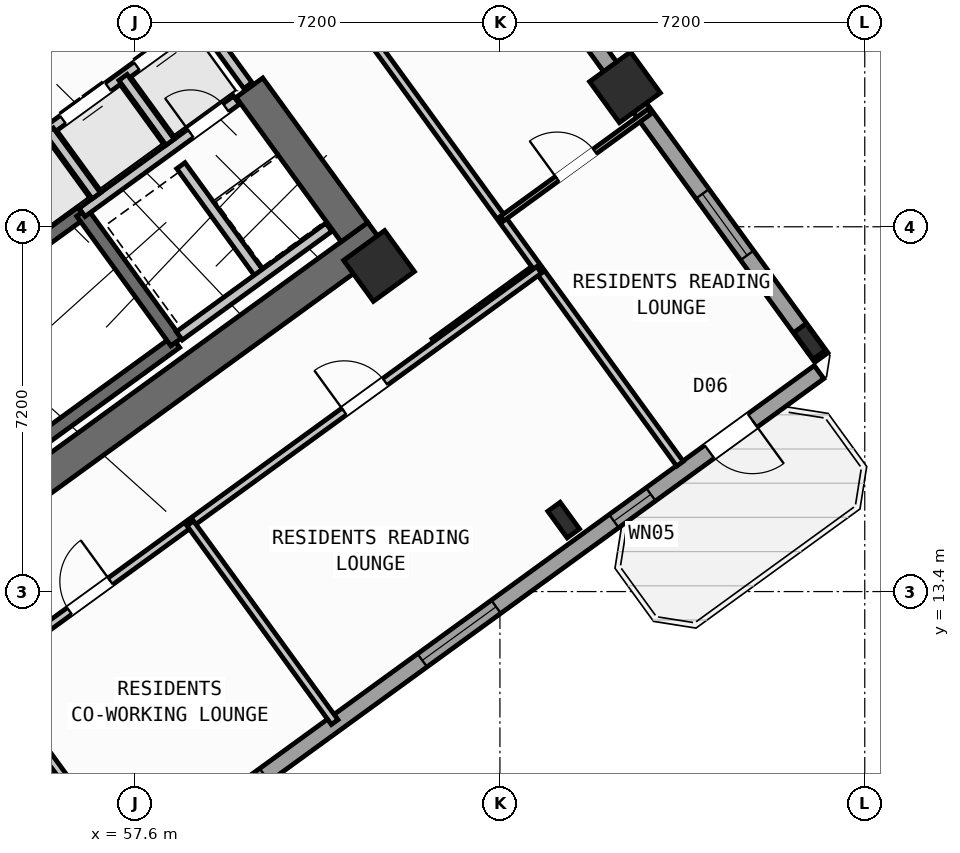
"""IFC4 building model, lengths in metres.
Left out: names, types, materials, properties, quantities, classifications, styles, units other than length and angle.
Written with IfcOpenShell. Run it as: python <this file> out.ifc"""

import sys

from ifc_helpers import new_model, si_unit, direction, frame, frame_2d, origin, origin_2d, place, context, subcontext, project, spatial, rectangle, hollow_rectangle, i_section, extrude, source, transform, mapped, element, fill, save


model = new_model("IFC4")
c1 = context("Model", 3, precision=1e-05, world=origin(), true_north=direction((0.0, 1.0)))
c2 = subcontext(c1, "Body", "Model", "MODEL_VIEW")
j1 = project(units=[si_unit("LENGTHUNIT", "METRE"), si_unit("PLANEANGLEUNIT", "RADIAN")], contexts=[c1])
p1 = place(None, origin())
s1 = spatial("IfcSite", under=j1, at=p1, CompositionType="ELEMENT")
p2 = place(p1, origin())
s2 = spatial("IfcBuilding", under=s1, at=p2, CompositionType="ELEMENT")
p3 = place(p2, frame((0.0, 0.0, 34.8)))
s3 = spatial("IfcBuildingStorey", under=s2, at=p3, CompositionType="ELEMENT", Elevation=34.8)
p4 = place(p3, frame((52.318, 13.11, 0.0), z_axis=(0.0, 0.0, 1.0), x_axis=(0.809019445368, 0.587781878776, 0.0)))
e1 = element("IfcWall", 1, at=p4, inside=s3, PredefinedType="SHEAR", context=c2, shape_type="SweptSolid", body=[
    extrude(rectangle(XDim=12.44, YDim=0.65, at=frame_2d((6.22, 0.0))), origin(), (0.0, 0.0, 1.0), 3.35),
])
p5 = place(p3, frame((61.929, 20.494, 0.0), z_axis=(0.0, 0.0, 1.0), x_axis=(-0.58782982593, 0.808984607855, 0.0)))
e2 = element("IfcWall", 2, at=p5, inside=s3, PredefinedType="SHEAR", context=c2, shape_type="SweptSolid", body=[
    extrude(rectangle(XDim=3.525, YDim=0.65, at=frame_2d((1.762, 0.0))), origin(), (0.0, 0.0, 1.0), 3.35),
])
m1 = source(origin(), c2, "Body", "SweptSolid", [
    extrude(i_section(OverallWidth=0.3, OverallDepth=0.65, WebThickness=0.016, FlangeThickness=0.031, at=origin_2d()), origin(), (0.0, 0.0, 1.0), 3.6),
])
p6 = place(p3, frame((66.058, 14.811, 0.0), z_axis=(0.0, 0.0, 1.0), x_axis=(0.809016994375, 0.587785252292, 0.0)))
e3 = element("IfcColumn", 3, at=p6, inside=s3, PredefinedType="COLUMN", context=c2, shape_type="MappedRepresentation", body=[
    mapped(m1, transform((0.0, 0.0, 0.0), scale=1.0)),
])
m2 = source(origin(), c2, "Body", "SweptSolid", [
    extrude(hollow_rectangle(XDim=1.0, YDim=1.0, WallThickness=0.04, at=origin_2d()), origin(), (0.0, 0.0, 1.0), 3.6),
])
p7 = place(p3, frame((62.414, 19.827, 0.0), z_axis=(0.0, 0.0, 1.0), x_axis=(0.809016994375, 0.587785252292, 0.0)))
e4 = element("IfcColumn", 4, at=p7, inside=s3, PredefinedType="COLUMN", context=c2, shape_type="MappedRepresentation", body=[
    mapped(m2, transform((0.0, 0.0, 0.0), scale=1.0)),
])
p8 = place(p3, frame((70.912, 18.338, 0.0), z_axis=(0.0, 0.0, 1.0), x_axis=(0.809016994375, 0.587785252292, 0.0)))
e5 = element("IfcColumn", 5, at=p8, inside=s3, PredefinedType="COLUMN", context=c2, shape_type="MappedRepresentation", body=[
    mapped(m1, transform((0.0, 0.0, 0.0), scale=1.0)),
])
p9 = place(p3, frame((67.268, 23.354, 0.0), z_axis=(0.0, 0.0, 1.0), x_axis=(0.809016994375, 0.587785252292, 0.0)))
e6 = element("IfcColumn", 6, at=p9, inside=s3, PredefinedType="COLUMN", context=c2, shape_type="MappedRepresentation", body=[
    mapped(m2, transform((0.0, 0.0, 0.0), scale=1.0)),
])
p10 = place(p3, frame((58.455, 35.484, 0.0), z_axis=(0.0, 0.0, 1.0), x_axis=(0.587783625747, -0.809018176127, 0.0)))
e7 = element("IfcWall", 7, at=p10, inside=s3, PredefinedType="STANDARD", context=c2, shape_type="SweptSolid", body=[
    extrude(rectangle(XDim=21.587, YDim=0.32, at=frame_2d((10.794, 0.0))), origin(), (0.0, 0.0, 1.0), 2.725),
])
p11 = place(p10, frame((1.529, 0.0, 0.85)))
e8 = element("IfcOpeningElement", 8, at=p11, cuts=e7, PredefinedType="OPENING", context=c2, shape_type="SweptSolid", body=[
    extrude(rectangle(XDim=1.8, YDim=1.5, at=frame_2d((0.9, 0.75))), frame((0.0, 0.17, 0.0), z_axis=(0.0, -1.0, 0.0), x_axis=(1.0, 0.0, 0.0)), (0.0, 0.0, 1.0), 0.34),
])
p12 = place(p10, frame((10.444, 0.0, 0.85)))
e9 = element("IfcOpeningElement", 9, at=p12, cuts=e7, PredefinedType="OPENING", context=c2, shape_type="SweptSolid", body=[
    extrude(rectangle(XDim=1.8, YDim=1.5, at=frame_2d((0.9, 0.75))), frame((0.0, 0.17, 0.0), z_axis=(0.0, -1.0, 0.0), x_axis=(1.0, 0.0, 0.0)), (0.0, 0.0, 1.0), 0.34),
])
p13 = place(p10, frame((17.595, 0.0, 0.85)))
e10 = element("IfcOpeningElement", 10, at=p13, cuts=e7, PredefinedType="OPENING", context=c2, shape_type="SweptSolid", body=[
    extrude(rectangle(XDim=1.5, YDim=1.5, at=frame_2d((0.75, 0.75))), frame((0.0, 0.17, 0.0), z_axis=(0.0, -1.0, 0.0), x_axis=(1.0, 0.0, 0.0)), (0.0, 0.0, 1.0), 0.34),
])
p14 = place(p3, frame((71.098, 17.731, 0.0), z_axis=(0.0, 0.0, 1.0), x_axis=(-0.809021120468, -0.587779573171, 0.0)))
e11 = element("IfcWall", 11, at=p14, inside=s3, PredefinedType="STANDARD", context=c2, shape_type="SweptSolid", body=[
    extrude(rectangle(XDim=17.588, YDim=0.32, at=frame_2d((8.794, 0.0))), origin(), (0.0, 0.0, 1.0), 3.35),
])
p15 = place(p14, frame((1.624, 0.0, 0.0)))
e12 = element("IfcOpeningElement", 12, at=p15, cuts=e11, PredefinedType="OPENING", context=c2, shape_type="SweptSolid", body=[
    extrude(rectangle(XDim=1.05, YDim=2.15, at=frame_2d((0.525, 1.075))), frame((0.0, 0.17, 0.0), z_axis=(0.0, -1.0, 0.0), x_axis=(1.0, 0.0, 0.0)), (0.0, 0.0, 1.0), 0.34),
])
p16 = place(p14, frame((4.104, 0.0, 1.0)))
e13 = element("IfcOpeningElement", 13, at=p16, cuts=e11, PredefinedType="OPENING", context=c2, shape_type="SweptSolid", body=[
    extrude(rectangle(XDim=0.9, YDim=1.25, at=frame_2d((0.45, 0.625))), frame((0.0, 0.17, 0.0), z_axis=(0.0, -1.0, 0.0), x_axis=(1.0, 0.0, 0.0)), (0.0, 0.0, 1.0), 0.34),
])
p17 = place(p14, frame((7.879, 0.0, 0.85)))
e14 = element("IfcOpeningElement", 14, at=p17, cuts=e11, PredefinedType="OPENING", context=c2, shape_type="SweptSolid", body=[
    extrude(rectangle(XDim=1.8, YDim=1.5, at=frame_2d((0.9, 0.75))), frame((0.0, 0.17, 0.0), z_axis=(0.0, -1.0, 0.0), x_axis=(1.0, 0.0, 0.0)), (0.0, 0.0, 1.0), 0.34),
])
p18 = place(p14, frame((13.529, 0.0, 0.85)))
e15 = element("IfcOpeningElement", 15, at=p18, cuts=e11, PredefinedType="OPENING", context=c2, shape_type="SweptSolid", body=[
    extrude(rectangle(XDim=1.5, YDim=1.5, at=frame_2d((0.75, 0.75))), frame((0.0, 0.17, 0.0), z_axis=(0.0, -1.0, 0.0), x_axis=(1.0, 0.0, 0.0)), (0.0, 0.0, 1.0), 0.34),
])
p19 = place(p3, frame((56.581, 7.439, 0.0), z_axis=(0.0, 0.0, 1.0), x_axis=(-0.587785875463, 0.809016541614, 0.0)))
e16 = element("IfcWall", 16, at=p19, inside=s3, PredefinedType="STANDARD", context=c2, shape_type="SweptSolid", body=[
    extrude(rectangle(XDim=6.774, YDim=0.32, at=frame_2d((3.387, 0.0))), origin(), (0.0, 0.0, 1.0), 2.725),
])
p20 = place(p19, frame((1.556, 0.0, 0.8)))
e17 = element("IfcOpeningElement", 17, at=p20, cuts=e16, PredefinedType="OPENING", context=c2, shape_type="SweptSolid", body=[
    extrude(rectangle(XDim=2.1, YDim=1.55, at=frame_2d((1.05, 0.775))), frame((0.0, 0.17, 0.0), z_axis=(0.0, -1.0, 0.0), x_axis=(1.0, 0.0, 0.0)), (0.0, 0.0, 1.0), 0.34),
])
p21 = place(p3, frame((49.863, 23.44, 0.0), z_axis=(0.0, 0.0, 1.0), x_axis=(0.809003474932, 0.587803859759, 0.0)))
e18 = element("IfcWall", 18, at=p21, inside=s3, PredefinedType="SHEAR", context=c2, shape_type="SweptSolid", body=[
    extrude(rectangle(XDim=7.46, YDim=0.26, at=frame_2d((3.73, 0.0))), origin(), (0.0, 0.0, 1.0), 3.35),
])
p22 = place(p21, frame((0.36, 0.0, 0.0)))
e19 = element("IfcOpeningElement", 19, at=p22, cuts=e18, PredefinedType="OPENING", context=c2, shape_type="SweptSolid", body=[
    extrude(rectangle(XDim=0.86, YDim=2.05, at=frame_2d((0.43, 1.025))), frame((0.0, 0.14, 0.0), z_axis=(0.0, -1.0, 0.0), x_axis=(1.0, 0.0, 0.0)), (0.0, 0.0, 1.0), 0.28),
])
p23 = place(p3, frame((52.472, 14.013, 0.0), z_axis=(0.0, 0.0, 1.0), x_axis=(0.809028366311, 0.587769599847, 0.0)))
e20 = element("IfcWall", 20, at=p23, inside=s3, PredefinedType="SHEAR", context=c2, shape_type="SweptSolid", body=[
    extrude(rectangle(XDim=7.33, YDim=0.26, at=frame_2d((3.665, 0.0))), origin(), (0.0, 0.0, 1.0), 3.35),
])
p24 = place(p3, frame((50.615, 16.57, 0.0), z_axis=(0.0, 0.0, 1.0), x_axis=(0.809028366311, 0.587769599847, 0.0)))
e21 = element("IfcWall", 21, at=p24, inside=s3, PredefinedType="SHEAR", context=c2, shape_type="SweptSolid", body=[
    extrude(rectangle(XDim=7.33, YDim=0.26, at=frame_2d((3.665, 0.0))), origin(), (0.0, 0.0, 1.0), 3.35),
])
p25 = place(p24, frame((0.22, 0.0, 0.0)))
e22 = element("IfcOpeningElement", 22, at=p25, cuts=e21, PredefinedType="OPENING", context=c2, shape_type="SweptSolid", body=[
    extrude(rectangle(XDim=1.1, YDim=2.1, at=frame_2d((0.55, 1.05))), frame((0.0, 0.14, 0.0), z_axis=(0.0, -1.0, 0.0), x_axis=(1.0, 0.0, 0.0)), (0.0, 0.0, 1.0), 0.28),
])
p26 = place(p3, frame((58.41, 18.327, 0.0), z_axis=(0.0, 0.0, 1.0), x_axis=(-0.58776738483, 0.809029975545, 0.0)))
e23 = element("IfcWall", 23, at=p26, inside=s3, PredefinedType="SHEAR", context=c2, shape_type="SweptSolid", body=[
    extrude(rectangle(XDim=3.16, YDim=0.26, at=frame_2d((1.58, 0.0))), origin(), (0.0, 0.0, 1.0), 3.35),
])
p27 = place(p3, frame((56.553, 20.884, 0.0), z_axis=(0.0, 0.0, 1.0), x_axis=(0.809035789462, 0.587759382205, 0.0)))
e24 = element("IfcWall", 24, at=p27, inside=s3, PredefinedType="STANDARD", context=c2, shape_type="SweptSolid", body=[
    extrude(rectangle(XDim=3.768, YDim=0.2, at=frame_2d((1.884, 0.0))), origin(), (0.0, 0.0, 1.0), 3.34),
])
p28 = place(p27, frame((2.65, 0.0, 0.0)))
e25 = element("IfcOpeningElement", 25, at=p28, cuts=e24, PredefinedType="OPENING", context=c2, shape_type="SweptSolid", body=[
    extrude(rectangle(XDim=0.86, YDim=2.05, at=frame_2d((0.43, 1.025))), frame((0.0, 0.11, 0.0), z_axis=(0.0, -1.0, 0.0), x_axis=(1.0, 0.0, 0.0)), (0.0, 0.0, 1.0), 0.22),
])
p29 = place(p3, frame((54.421, 21.436, 0.0), z_axis=(0.0, 0.0, 1.0), x_axis=(0.809013710463, 0.587789772183, 0.0)))
e26 = element("IfcWall", 26, at=p29, inside=s3, PredefinedType="STANDARD", context=c2, shape_type="SweptSolid", body=[
    extrude(rectangle(XDim=5.36, YDim=0.2, at=frame_2d((2.68, 0.0))), origin(), (0.0, 0.0, 1.0), 3.34),
])
p30 = place(p29, frame((0.37, 0.0, 0.0)))
e27 = element("IfcOpeningElement", 27, at=p30, cuts=e26, PredefinedType="OPENING", context=c2, shape_type="SweptSolid", body=[
    extrude(rectangle(XDim=1.1, YDim=2.15, at=frame_2d((0.55, 1.075))), frame((0.0, 0.11, 0.0), z_axis=(0.0, -1.0, 0.0), x_axis=(1.0, 0.0, 0.0)), (0.0, 0.0, 1.0), 0.22),
])
p31 = place(p29, frame((2.17, 0.0, 0.0)))
e28 = element("IfcOpeningElement", 28, at=p31, cuts=e26, PredefinedType="OPENING", context=c2, shape_type="SweptSolid", body=[
    extrude(rectangle(XDim=1.1, YDim=2.15, at=frame_2d((0.55, 1.075))), frame((0.0, 0.11, 0.0), z_axis=(0.0, -1.0, 0.0), x_axis=(1.0, 0.0, 0.0)), (0.0, 0.0, 1.0), 0.22),
])
p32 = place(p29, frame((3.97, 0.0, 0.0)))
e29 = element("IfcOpeningElement", 29, at=p32, cuts=e26, PredefinedType="OPENING", context=c2, shape_type="SweptSolid", body=[
    extrude(rectangle(XDim=1.1, YDim=2.15, at=frame_2d((0.55, 1.075))), frame((0.0, 0.11, 0.0), z_axis=(0.0, -1.0, 0.0), x_axis=(1.0, 0.0, 0.0)), (0.0, 0.0, 1.0), 0.22),
])
p33 = place(p3, frame((56.834, 21.212, 0.0), z_axis=(0.0, 0.0, 1.0), x_axis=(-0.58776738483, 0.809029975545, 0.0)))
e30 = element("IfcWall", 30, at=p33, inside=s3, PredefinedType="STANDARD", context=c2, shape_type="SweptSolid", body=[
    extrude(rectangle(XDim=1.58, YDim=0.2, at=frame_2d((0.79, 0.0))), origin(), (0.0, 0.0, 1.0), 3.34),
])
p34 = place(p3, frame((58.29, 22.27, 0.0), z_axis=(0.0, 0.0, 1.0), x_axis=(-0.587840865826, 0.808976585857, 0.0)))
e31 = element("IfcWall", 31, at=p34, inside=s3, PredefinedType="STANDARD", context=c2, shape_type="SweptSolid", body=[
    extrude(rectangle(XDim=1.58, YDim=0.2, at=frame_2d((0.79, 0.0))), origin(), (0.0, 0.0, 1.0), 3.34),
])
p35 = place(p3, frame((60.067, 19.655, 0.0), z_axis=(0.0, 0.0, 1.0), x_axis=(-0.587800520745, 0.809005900975, 0.0)))
e32 = element("IfcWall", 32, at=p35, inside=s3, PredefinedType="STANDARD", context=c2, shape_type="SweptSolid", body=[
    extrude(rectangle(XDim=2.66, YDim=0.2, at=frame_2d((1.33, 0.0))), origin(), (0.0, 0.0, 1.0), 3.34),
])
p36 = place(p3, frame((58.472, 18.447, 0.0), z_axis=(0.0, 0.0, 1.0), x_axis=(0.809022487728, 0.587777691266, 0.0)))
e33 = element("IfcWall", 33, at=p36, inside=s3, PredefinedType="STANDARD", context=c2, shape_type="SweptSolid", body=[
    extrude(rectangle(XDim=3.648, YDim=0.2, at=frame_2d((1.824, 0.0))), origin(), (0.0, 0.0, 1.0), 3.34),
])
p37 = place(p3, frame((53.425, 22.468, 0.0), z_axis=(0.0, 0.0, 1.0), x_axis=(0.80902705128, 0.587771409902, 0.0)))
e34 = element("IfcWall", 34, at=p37, inside=s3, PredefinedType="STANDARD", context=c2, shape_type="SweptSolid", body=[
    extrude(rectangle(XDim=5.368, YDim=0.2, at=frame_2d((2.684, 0.0))), origin(), (0.0, 0.0, 1.0), 3.34),
])
p38 = place(p37, frame((4.28, 0.0, 0.0)))
e35 = element("IfcOpeningElement", 35, at=p38, cuts=e34, PredefinedType="OPENING", context=c2, shape_type="SweptSolid", body=[
    extrude(rectangle(XDim=0.86, YDim=2.05, at=frame_2d((0.43, 1.025))), frame((0.0, 0.11, 0.0), z_axis=(0.0, -1.0, 0.0), x_axis=(1.0, 0.0, 0.0)), (0.0, 0.0, 1.0), 0.22),
])
p39 = place(p37, frame((0.35, 0.0, 0.0)))
e36 = element("IfcOpeningElement", 36, at=p39, cuts=e34, PredefinedType="OPENING", context=c2, shape_type="SweptSolid", body=[
    extrude(rectangle(XDim=0.86, YDim=2.05, at=frame_2d((0.43, 1.025))), frame((0.0, 0.11, 0.0), z_axis=(0.0, -1.0, 0.0), x_axis=(1.0, 0.0, 0.0)), (0.0, 0.0, 1.0), 0.22),
])
p40 = place(p3, frame((59.827, 23.386, 0.0), z_axis=(0.0, 0.0, 1.0), x_axis=(-0.587803840107, 0.809003489211, 0.0)))
e37 = element("IfcWall", 37, at=p40, inside=s3, PredefinedType="STANDARD", context=c2, shape_type="SweptSolid", body=[
    extrude(rectangle(XDim=2.96, YDim=0.2, at=frame_2d((1.48, 0.0))), origin(), (0.0, 0.0, 1.0), 3.34),
])
p41 = place(p40, frame((1.68, 0.0, 0.0)))
e38 = element("IfcOpeningElement", 38, at=p41, cuts=e37, PredefinedType="OPENING", context=c2, shape_type="SweptSolid", body=[
    extrude(rectangle(XDim=1.0, YDim=2.1, at=frame_2d((0.5, 1.05))), frame((0.0, 0.11, 0.0), z_axis=(0.0, -1.0, 0.0), x_axis=(1.0, 0.0, 0.0)), (0.0, 0.0, 1.0), 0.22),
])
p42 = place(p3, frame((63.507, 18.322, 0.0), z_axis=(0.0, 0.0, 1.0), x_axis=(0.809034604122, 0.587761013791, 0.0)))
e39 = element("IfcWall", 39, at=p42, inside=s3, PredefinedType="PARTITIONING", context=c2, shape_type="SweptSolid", body=[
    extrude(rectangle(XDim=2.51, YDim=0.16, at=frame_2d((1.255, 0.0))), origin(), (0.0, 0.0, 1.0), 3.34),
])
p43 = place(p3, frame((68.353, 15.922, 0.0), z_axis=(0.0, 0.0, 1.0), x_axis=(-0.587782002009, 0.809019355834, 0.0)))
e40 = element("IfcWall", 40, at=p43, inside=s3, PredefinedType="PARTITIONING", context=c2, shape_type="SweptSolid", body=[
    extrude(rectangle(XDim=15.35, YDim=0.16, at=frame_2d((7.675, 0.0))), origin(), (0.0, 0.0, 1.0), 3.34),
])
p44 = place(p3, frame((64.839, 20.759, 0.0), z_axis=(0.0, 0.0, 1.0), x_axis=(0.809013833588, 0.587789602718, 0.0)))
e41 = element("IfcWall", 41, at=p44, inside=s3, PredefinedType="PARTITIONING", context=c2, shape_type="SweptSolid", body=[
    extrude(rectangle(XDim=3.61, YDim=0.11, at=frame_2d((1.805, 0.0))), origin(), (0.0, 0.0, 1.0), 3.34),
])
p45 = place(p44, frame((1.345, 0.0, 0.0)))
e42 = element("IfcOpeningElement", 42, at=p45, cuts=e41, PredefinedType="OPENING", context=c2, shape_type="SweptSolid", body=[
    extrude(rectangle(XDim=0.92, YDim=2.08, at=frame_2d((0.46, 1.04))), frame((0.0, 0.065, 0.0), z_axis=(0.0, -1.0, 0.0), x_axis=(1.0, 0.0, 0.0)), (0.0, 0.0, 1.0), 0.13),
])
p46 = place(p3, frame((53.705, 11.126, 0.0), z_axis=(0.0, 0.0, 1.0), x_axis=(0.809014504436, 0.587788679384, 0.0)))
e43 = element("IfcWall", 43, at=p46, inside=s3, PredefinedType="PARTITIONING", context=c2, shape_type="SweptSolid", body=[
    extrude(rectangle(XDim=14.67, YDim=0.16, at=frame_2d((7.335, 0.0))), origin(), (0.0, 0.0, 1.0), 3.34),
])
p47 = place(p46, frame((3.215, 0.0, 0.0)))
e44 = element("IfcOpeningElement", 44, at=p47, cuts=e43, PredefinedType="OPENING", context=c2, shape_type="SweptSolid", body=[
    extrude(rectangle(XDim=1.0, YDim=2.1, at=frame_2d((0.5, 1.05))), frame((0.0, 0.09, 0.0), z_axis=(0.0, -1.0, 0.0), x_axis=(1.0, 0.0, 0.0)), (0.0, 0.0, 1.0), 0.18),
])
p48 = place(p46, frame((9.915, 0.0, 0.0)))
e45 = element("IfcOpeningElement", 45, at=p48, cuts=e43, PredefinedType="OPENING", context=c2, shape_type="SweptSolid", body=[
    extrude(rectangle(XDim=1.0, YDim=2.1, at=frame_2d((0.5, 1.05))), frame((0.0, 0.09, 0.0), z_axis=(0.0, -1.0, 0.0), x_axis=(1.0, 0.0, 0.0)), (0.0, 0.0, 1.0), 0.18),
])
p49 = place(p3, frame((57.747, 7.586, 0.0), z_axis=(0.0, 0.0, 1.0), x_axis=(-0.587784893399, 0.809017255126, 0.0)))
e46 = element("IfcWall", 46, at=p49, inside=s3, PredefinedType="PARTITIONING", context=c2, shape_type="SweptSolid", body=[
    extrude(rectangle(XDim=5.48, YDim=0.16, at=frame_2d((2.74, 0.0))), origin(), (0.0, 0.0, 1.0), 3.34),
])
p50 = place(p3, frame((61.539, 10.823, 0.0), z_axis=(0.0, 0.0, 1.0), x_axis=(-0.587785532001, 0.809016791155, 0.0)))
e47 = element("IfcWall", 47, at=p50, inside=s3, PredefinedType="PARTITIONING", context=c2, shape_type="SweptSolid", body=[
    extrude(rectangle(XDim=4.85, YDim=0.16, at=frame_2d((2.425, 0.0))), origin(), (0.0, 0.0, 1.0), 3.34),
])
m3 = source(origin(), c2, "Body", "SweptSolid", [
    extrude(rectangle(XDim=1.05, YDim=2.15, at=frame_2d((0.525, 1.075))), frame((0.0, 0.025, 0.0), z_axis=(0.0, -1.0, 0.0), x_axis=(1.0, 0.0, 0.0)), (0.0, 0.0, 1.0), 0.05),
])
p51 = place(p15, origin())
e48 = element("IfcDoor", 48, at=p51, inside=s3, OperationType="SINGLE_SWING_LEFT", PredefinedType="DOOR", context=c2, shape_type="MappedRepresentation", body=[
    mapped(m3, transform((0.0, 0.0, 0.0), scale=1.0)),
])
fill(e12, e48)
m4 = source(origin(), c2, "Body", "SweptSolid", [
    extrude(rectangle(XDim=1.5, YDim=1.5, at=frame_2d((0.75, 0.75))), frame((0.0, 0.03, 0.0), z_axis=(0.0, -1.0, 0.0), x_axis=(1.0, 0.0, 0.0)), (0.0, 0.0, 1.0), 0.06),
])
p52 = place(p13, origin())
e49 = element("IfcWindow", 49, at=p52, inside=s3, PartitioningType="SINGLE_PANEL", PredefinedType="WINDOW", context=c2, shape_type="MappedRepresentation", body=[
    mapped(m4, transform((0.0, 0.0, 0.0), scale=1.0)),
])
fill(e10, e49)
m5 = source(origin(), c2, "Body", "SweptSolid", [
    extrude(rectangle(XDim=0.9, YDim=1.25, at=frame_2d((0.45, 0.625))), frame((0.0, 0.03, 0.0), z_axis=(0.0, -1.0, 0.0), x_axis=(1.0, 0.0, 0.0)), (0.0, 0.0, 1.0), 0.06),
])
p53 = place(p16, origin())
e50 = element("IfcWindow", 50, at=p53, inside=s3, PartitioningType="SINGLE_PANEL", PredefinedType="WINDOW", context=c2, shape_type="MappedRepresentation", body=[
    mapped(m5, transform((0.0, 0.0, 0.0), scale=1.0)),
])
fill(e13, e50)
m6 = source(origin(), c2, "Body", "SweptSolid", [
    extrude(rectangle(XDim=1.8, YDim=1.5, at=frame_2d((0.9, 0.75))), frame((0.0, 0.03, 0.0), z_axis=(0.0, -1.0, 0.0), x_axis=(1.0, 0.0, 0.0)), (0.0, 0.0, 1.0), 0.06),
])
p54 = place(p17, origin())
e51 = element("IfcWindow", 51, at=p54, inside=s3, PartitioningType="SINGLE_PANEL", PredefinedType="WINDOW", context=c2, shape_type="MappedRepresentation", body=[
    mapped(m6, transform((0.0, 0.0, 0.0), scale=1.0)),
])
fill(e14, e51)
m7 = source(origin(), c2, "Body", "SweptSolid", [
    extrude(rectangle(XDim=1.1, YDim=2.15, at=frame_2d((0.55, 1.075))), frame((0.0, 0.025, 0.0), z_axis=(0.0, -1.0, 0.0), x_axis=(1.0, 0.0, 0.0)), (0.0, 0.0, 1.0), 0.05),
])
p55 = place(p31, origin())
e52 = element("IfcDoor", 52, at=p55, inside=s3, OperationType="DOUBLE_DOOR_SLIDING", PredefinedType="DOOR", context=c2, shape_type="MappedRepresentation", body=[
    mapped(m7, transform((0.0, 0.0, 0.0), scale=1.0)),
])
fill(e28, e52)
p56 = place(p32, origin())
e53 = element("IfcDoor", 53, at=p56, inside=s3, OperationType="DOUBLE_DOOR_SLIDING", PredefinedType="DOOR", context=c2, shape_type="MappedRepresentation", body=[
    mapped(m7, transform((0.0, 0.0, 0.0), scale=1.0)),
])
fill(e29, e53)
m8 = source(origin(), c2, "Body", "SweptSolid", [
    extrude(rectangle(XDim=0.86, YDim=2.05, at=frame_2d((0.43, 1.025))), frame((0.0, 0.025, 0.0), z_axis=(0.0, -1.0, 0.0), x_axis=(1.0, 0.0, 0.0)), (0.0, 0.0, 1.0), 0.05),
])
p57 = place(p28, origin())
e54 = element("IfcDoor", 54, at=p57, inside=s3, OperationType="SINGLE_SWING_LEFT", PredefinedType="DOOR", context=c2, shape_type="MappedRepresentation", body=[
    mapped(m8, transform((0.0, 0.0, 0.0), scale=1.0)),
])
fill(e25, e54)
m9 = source(origin(), c2, "Body", "SweptSolid", [
    extrude(rectangle(XDim=0.92, YDim=2.08, at=frame_2d((0.46, 1.04))), frame((0.0, 0.025, 0.0), z_axis=(0.0, -1.0, 0.0), x_axis=(1.0, 0.0, 0.0)), (0.0, 0.0, 1.0), 0.05),
])
p58 = place(p45, origin())
e55 = element("IfcDoor", 55, at=p58, inside=s3, OperationType="SINGLE_SWING_LEFT", PredefinedType="DOOR", context=c2, shape_type="MappedRepresentation", body=[
    mapped(m9, transform((0.0, 0.0, 0.0), scale=1.0)),
])
fill(e42, e55)
m10 = source(origin(), c2, "Body", "SweptSolid", [
    extrude(rectangle(XDim=1.0, YDim=2.1, at=frame_2d((0.5, 1.05))), frame((0.0, 0.025, 0.0), z_axis=(0.0, -1.0, 0.0), x_axis=(1.0, 0.0, 0.0)), (0.0, 0.0, 1.0), 0.05),
])
p59 = place(p47, origin())
e56 = element("IfcDoor", 56, at=p59, inside=s3, OperationType="SINGLE_SWING_RIGHT", PredefinedType="DOOR", context=c2, shape_type="MappedRepresentation", body=[
    mapped(m10, transform((0.0, 0.0, 0.0), scale=1.0)),
])
fill(e44, e56)
p60 = place(p48, origin())
e57 = element("IfcDoor", 57, at=p60, inside=s3, OperationType="SINGLE_SWING_LEFT", PredefinedType="DOOR", context=c2, shape_type="MappedRepresentation", body=[
    mapped(m10, transform((0.0, 0.0, 0.0), scale=1.0)),
])
fill(e45, e57)
save(model, sys.argv[1])
